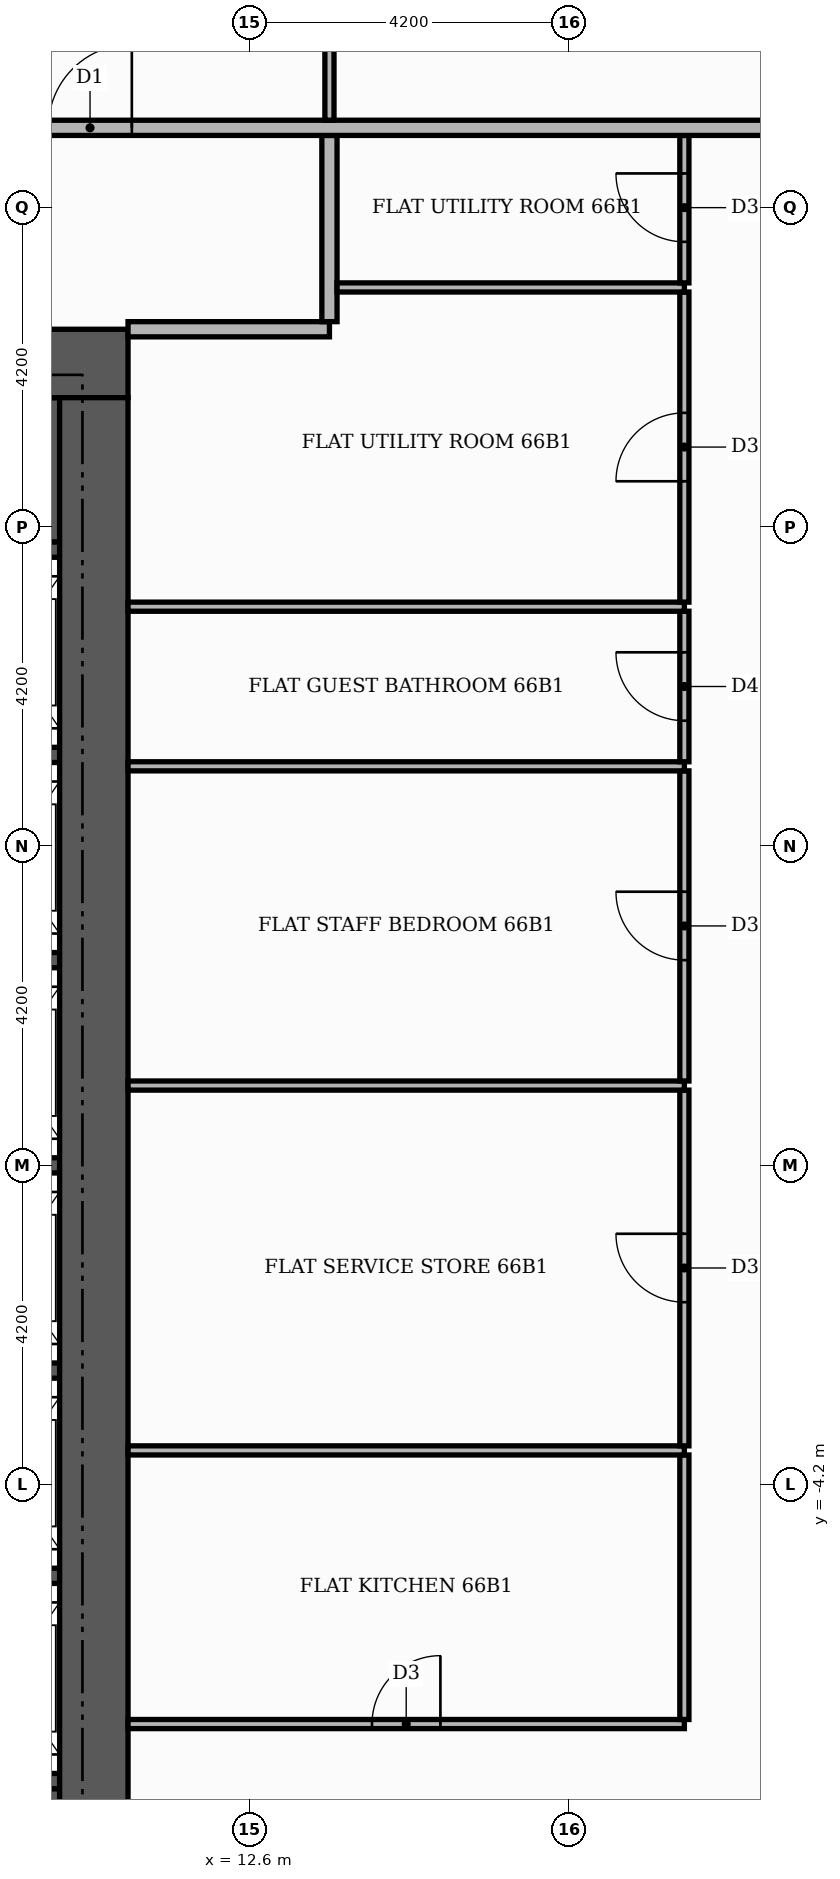
"""IFC4 building model, lengths in metres.
Left out: names, types, materials, properties, quantities, classifications, styles, units other than length and angle.
Written with IfcOpenShell. Run it as: python <this file> out.ifc"""

import sys

from ifc_helpers import new_model, si_unit, direction, frame, frame_2d, origin, place, context, subcontext, project, spatial, rectangle, extrude, element, fill, save


model = new_model("IFC4")
c1 = context("Model", 3, precision=1e-05, world=origin(), true_north=direction((0.0, 1.0)))
c2 = subcontext(c1, "Body", "Model", "MODEL_VIEW")
j1 = project(units=[si_unit("LENGTHUNIT", "METRE"), si_unit("PLANEANGLEUNIT", "RADIAN")], contexts=[c1])
p1 = place(None, origin())
s1 = spatial("IfcSite", under=j1, at=p1, CompositionType="ELEMENT")
p2 = place(p1, origin())
s2 = spatial("IfcBuilding", under=s1, at=p2, CompositionType="ELEMENT")
p3 = place(p2, frame((0.0, 0.0, 275.7)))
s3 = spatial("IfcBuildingStorey", under=s2, at=p3, CompositionType="ELEMENT", Elevation=275.7)
for number, where, z_axis, x_axis in (
    (1, (5.5, -9.15, 0.0), (0.0, 0.0, 1.0), (1.0, 0.0, 0.0)),
    (2, (5.5, 9.15, 0.0), (0.0, 0.0, 1.0), (1.0, 0.0, 0.0)),
):
    element("IfcWall", number, at=place(p3, frame(where, z_axis=z_axis, x_axis=x_axis)), inside=s3, PredefinedType="SHEAR", context=c2, shape_type="SweptSolid", body=[
        extrude(rectangle(XDim=4.6, YDim=1.9, at=frame_2d((2.3, 0.0))), origin(), (0.0, 0.0, 1.0), 3.48),
    ])
for number, where, z_axis, x_axis in (
    (3, (8.1, -8.1, 0.0), (0.0, 0.0, 1.0), (1.0, 0.0, 0.0)),
    (4, (8.1, -5.4, 0.0), (0.0, 0.0, 1.0), (1.0, 0.0, 0.0)),
    (5, (8.1, -2.7, 0.0), (0.0, 0.0, 1.0), (1.0, 0.0, 0.0)),
    (6, (8.1, 0.0, 0.0), (0.0, 0.0, 1.0), (1.0, 0.0, 0.0)),
    (7, (8.1, 2.7, 0.0), (0.0, 0.0, 1.0), (1.0, 0.0, 0.0)),
    (8, (8.1, 5.4, 0.0), (0.0, 0.0, 1.0), (1.0, 0.0, 0.0)),
    (9, (8.1, 8.1, 0.0), (0.0, 0.0, 1.0), (1.0, 0.0, 0.0)),
):
    element("IfcWall", number, at=place(p3, frame(where, z_axis=z_axis, x_axis=x_axis)), inside=s3, PredefinedType="SHEAR", context=c2, shape_type="SweptSolid", body=[
        extrude(rectangle(XDim=2.0, YDim=0.2, at=frame_2d((1.0, 0.0))), origin(), (0.0, 0.0, 1.0), 3.48),
    ])
p4 = place(p3, frame((-11.0, 10.55, 0.0), z_axis=(0.0, 0.0, 1.0), x_axis=(1.0, 0.0, 0.0)))
e10 = element("IfcWall", 10, at=p4, inside=s3, PredefinedType="SHEAR", context=c2, shape_type="SweptSolid", body=[
    extrude(rectangle(XDim=22.0, YDim=0.9, at=frame_2d((11.0, 0.0))), origin(), (0.0, 0.0, 1.0), 3.48),
])
p5 = place(p4, frame((13.3, 0.0, 0.0)))
e11 = element("IfcOpeningElement", 11, at=p5, cuts=e10, PredefinedType="OPENING", context=c2, shape_type="SweptSolid", body=[
    extrude(rectangle(XDim=1.8, YDim=2.2, at=frame_2d((0.9, 1.1))), frame((0.0, 0.46, 0.0), z_axis=(0.0, -1.0, 0.0), x_axis=(1.0, 0.0, 0.0)), (0.0, 0.0, 1.0), 0.92),
])
p6 = place(p3, frame((10.55, -10.1, 0.0), z_axis=(0.0, 0.0, 1.0), x_axis=(0.0, 1.0, 0.0)))
e12 = element("IfcWall", 12, at=p6, inside=s3, PredefinedType="SHEAR", context=c2, shape_type="SweptSolid", body=[
    extrude(rectangle(XDim=20.2, YDim=0.9, at=frame_2d((10.1, 0.0))), origin(), (0.0, 0.0, 1.0), 3.48),
])
p7 = place(p3, frame((11.0, -7.35, 0.0), z_axis=(0.0, 0.0, 1.0), x_axis=(1.0, 0.0, 0.0)))
e13 = element("IfcWall", 13, at=p7, inside=s3, PredefinedType="PARTITIONING", context=c2, shape_type="SweptSolid", body=[
    extrude(rectangle(XDim=7.32, YDim=0.12, at=frame_2d((3.66, 0.0))), origin(), (0.0, 0.0, 1.0), 3.48),
])
p8 = place(p7, frame((3.21, 0.0, 0.0)))
e14 = element("IfcOpeningElement", 14, at=p8, cuts=e13, PredefinedType="OPENING", context=c2, shape_type="SweptSolid", body=[
    extrude(rectangle(XDim=0.9, YDim=2.1, at=frame_2d((0.45, 1.05))), frame((0.0, 0.07, 0.0), z_axis=(0.0, -1.0, 0.0), x_axis=(1.0, 0.0, 0.0)), (0.0, 0.0, 1.0), 0.14),
])
p9 = place(p3, frame((18.32, -7.29, 0.0), z_axis=(0.0, 0.0, 1.0), x_axis=(0.0, 1.0, 0.0)))
e15 = element("IfcWall", 15, at=p9, inside=s3, PredefinedType="PARTITIONING", context=c2, shape_type="SweptSolid", body=[
    extrude(rectangle(XDim=3.48, YDim=0.12, at=frame_2d((1.74, 0.0))), origin(), (0.0, 0.0, 1.0), 3.48),
])
p10 = place(p3, frame((11.0, -3.75, 0.0), z_axis=(0.0, 0.0, 1.0), x_axis=(1.0, 0.0, 0.0)))
e16 = element("IfcWall", 16, at=p10, inside=s3, PredefinedType="PARTITIONING", context=c2, shape_type="SweptSolid", body=[
    extrude(rectangle(XDim=7.32, YDim=0.12, at=frame_2d((3.66, 0.0))), origin(), (0.0, 0.0, 1.0), 3.48),
])
p11 = place(p3, frame((18.32, -3.69, 0.0), z_axis=(0.0, 0.0, 1.0), x_axis=(0.0, 1.0, 0.0)))
e17 = element("IfcWall", 17, at=p11, inside=s3, PredefinedType="PARTITIONING", context=c2, shape_type="SweptSolid", body=[
    extrude(rectangle(XDim=4.68, YDim=0.12, at=frame_2d((2.34, 0.0))), origin(), (0.0, 0.0, 1.0), 3.48),
])
p12 = place(p11, frame((1.89, 0.0, 0.0)))
e18 = element("IfcOpeningElement", 18, at=p12, cuts=e17, PredefinedType="OPENING", context=c2, shape_type="SweptSolid", body=[
    extrude(rectangle(XDim=0.9, YDim=2.1, at=frame_2d((0.45, 1.05))), frame((0.0, 0.07, 0.0), z_axis=(0.0, -1.0, 0.0), x_axis=(1.0, 0.0, 0.0)), (0.0, 0.0, 1.0), 0.14),
])
p13 = place(p3, frame((11.0, 1.05, 0.0), z_axis=(0.0, 0.0, 1.0), x_axis=(1.0, 0.0, 0.0)))
e19 = element("IfcWall", 19, at=p13, inside=s3, PredefinedType="PARTITIONING", context=c2, shape_type="SweptSolid", body=[
    extrude(rectangle(XDim=7.32, YDim=0.12, at=frame_2d((3.66, 0.0))), origin(), (0.0, 0.0, 1.0), 3.48),
])
p14 = place(p3, frame((18.32, 1.11, 0.0), z_axis=(0.0, 0.0, 1.0), x_axis=(0.0, 1.0, 0.0)))
e20 = element("IfcWall", 20, at=p14, inside=s3, PredefinedType="PARTITIONING", context=c2, shape_type="SweptSolid", body=[
    extrude(rectangle(XDim=4.08, YDim=0.12, at=frame_2d((2.04, 0.0))), origin(), (0.0, 0.0, 1.0), 3.48),
])
p15 = place(p14, frame((1.59, 0.0, 0.0)))
e21 = element("IfcOpeningElement", 21, at=p15, cuts=e20, PredefinedType="OPENING", context=c2, shape_type="SweptSolid", body=[
    extrude(rectangle(XDim=0.9, YDim=2.1, at=frame_2d((0.45, 1.05))), frame((0.0, 0.07, 0.0), z_axis=(0.0, -1.0, 0.0), x_axis=(1.0, 0.0, 0.0)), (0.0, 0.0, 1.0), 0.14),
])
p16 = place(p3, frame((11.0, 5.25, 0.0), z_axis=(0.0, 0.0, 1.0), x_axis=(1.0, 0.0, 0.0)))
e22 = element("IfcWall", 22, at=p16, inside=s3, PredefinedType="PARTITIONING", context=c2, shape_type="SweptSolid", body=[
    extrude(rectangle(XDim=7.32, YDim=0.12, at=frame_2d((3.66, 0.0))), origin(), (0.0, 0.0, 1.0), 3.48),
])
p17 = place(p3, frame((18.32, 5.31, 0.0), z_axis=(0.0, 0.0, 1.0), x_axis=(0.0, 1.0, 0.0)))
e23 = element("IfcWall", 23, at=p17, inside=s3, PredefinedType="PARTITIONING", context=c2, shape_type="SweptSolid", body=[
    extrude(rectangle(XDim=1.98, YDim=0.12, at=frame_2d((0.99, 0.0))), origin(), (0.0, 0.0, 1.0), 3.48),
])
p18 = place(p17, frame((0.54, 0.0, 0.0)))
e24 = element("IfcOpeningElement", 24, at=p18, cuts=e23, PredefinedType="OPENING", context=c2, shape_type="SweptSolid", body=[
    extrude(rectangle(XDim=0.9, YDim=2.1, at=frame_2d((0.45, 1.05))), frame((0.0, 0.07, 0.0), z_axis=(0.0, -1.0, 0.0), x_axis=(1.0, 0.0, 0.0)), (0.0, 0.0, 1.0), 0.14),
])
p19 = place(p3, frame((11.0, 7.35, 0.0), z_axis=(0.0, 0.0, 1.0), x_axis=(1.0, 0.0, 0.0)))
e25 = element("IfcWall", 25, at=p19, inside=s3, PredefinedType="PARTITIONING", context=c2, shape_type="SweptSolid", body=[
    extrude(rectangle(XDim=7.32, YDim=0.12, at=frame_2d((3.66, 0.0))), origin(), (0.0, 0.0, 1.0), 3.48),
])
p20 = place(p3, frame((18.32, 7.41, 0.0), z_axis=(0.0, 0.0, 1.0), x_axis=(0.0, 1.0, 0.0)))
e26 = element("IfcWall", 26, at=p20, inside=s3, PredefinedType="PARTITIONING", context=c2, shape_type="SweptSolid", body=[
    extrude(rectangle(XDim=4.08, YDim=0.12, at=frame_2d((2.04, 0.0))), origin(), (0.0, 0.0, 1.0), 3.48),
])
p21 = place(p20, frame((1.59, 0.0, 0.0)))
e27 = element("IfcOpeningElement", 27, at=p21, cuts=e26, PredefinedType="OPENING", context=c2, shape_type="SweptSolid", body=[
    extrude(rectangle(XDim=0.9, YDim=2.1, at=frame_2d((0.45, 1.05))), frame((0.0, 0.07, 0.0), z_axis=(0.0, -1.0, 0.0), x_axis=(1.0, 0.0, 0.0)), (0.0, 0.0, 1.0), 0.14),
])
p22 = place(p3, frame((11.0, 11.0, 0.0), z_axis=(0.0, 0.0, 1.0), x_axis=(1.0, 0.0, 0.0)))
e28 = element("IfcWall", 28, at=p22, inside=s3, PredefinedType="PARTITIONING", context=c2, shape_type="SweptSolid", body=[
    extrude(rectangle(XDim=2.65, YDim=0.2, at=frame_2d((1.325, 0.0))), origin(), (0.0, 0.0, 1.0), 3.48),
])
p23 = place(p3, frame((13.65, 11.1, 0.0), z_axis=(0.0, 0.0, 1.0), x_axis=(0.0, 1.0, 0.0)))
e29 = element("IfcWall", 29, at=p23, inside=s3, PredefinedType="PARTITIONING", context=c2, shape_type="SweptSolid", body=[
    extrude(rectangle(XDim=2.45, YDim=0.2, at=frame_2d((1.225, 0.0))), origin(), (0.0, 0.0, 1.0), 3.48),
])
p24 = place(p3, frame((13.75, 11.55, 0.0), z_axis=(0.0, 0.0, 1.0), x_axis=(1.0, 0.0, 0.0)))
e30 = element("IfcWall", 30, at=p24, inside=s3, PredefinedType="PARTITIONING", context=c2, shape_type="SweptSolid", body=[
    extrude(rectangle(XDim=4.57, YDim=0.12, at=frame_2d((2.285, 0.0))), origin(), (0.0, 0.0, 1.0), 3.48),
])
p25 = place(p3, frame((18.32, 11.61, 0.0), z_axis=(0.0, 0.0, 1.0), x_axis=(0.0, 1.0, 0.0)))
e31 = element("IfcWall", 31, at=p25, inside=s3, PredefinedType="PARTITIONING", context=c2, shape_type="SweptSolid", body=[
    extrude(rectangle(XDim=1.94, YDim=0.12, at=frame_2d((0.97, 0.0))), origin(), (0.0, 0.0, 1.0), 3.48),
])
p26 = place(p25, frame((0.54, 0.0, 0.0)))
e32 = element("IfcOpeningElement", 32, at=p26, cuts=e31, PredefinedType="OPENING", context=c2, shape_type="SweptSolid", body=[
    extrude(rectangle(XDim=0.9, YDim=2.1, at=frame_2d((0.45, 1.05))), frame((0.0, 0.07, 0.0), z_axis=(0.0, -1.0, 0.0), x_axis=(1.0, 0.0, 0.0)), (0.0, 0.0, 1.0), 0.14),
])
p27 = place(p3, frame((-13.65, 13.65, 0.0), z_axis=(0.0, 0.0, 1.0), x_axis=(1.0, 0.0, 0.0)))
e33 = element("IfcWall", 33, at=p27, inside=s3, PredefinedType="PARTITIONING", context=c2, shape_type="SweptSolid", body=[
    extrude(rectangle(XDim=39.07, YDim=0.2, at=frame_2d((19.535, 0.0))), origin(), (0.0, 0.0, 1.0), 3.48),
])
p28 = place(p27, frame((23.6, 0.0, 0.0)))
e34 = element("IfcOpeningElement", 34, at=p28, cuts=e33, PredefinedType="OPENING", context=c2, shape_type="SweptSolid", body=[
    extrude(rectangle(XDim=1.1, YDim=2.4, at=frame_2d((0.55, 1.2))), frame((0.0, 0.11, 0.0), z_axis=(0.0, -1.0, 0.0), x_axis=(1.0, 0.0, 0.0)), (0.0, 0.0, 1.0), 0.22),
])
p29 = place(p3, frame((13.65, 13.75, 0.0), z_axis=(0.0, 0.0, 1.0), x_axis=(0.0, 1.0, 0.0)))
e35 = element("IfcWall", 35, at=p29, inside=s3, PredefinedType="PARTITIONING", context=c2, shape_type="SweptSolid", body=[
    extrude(rectangle(XDim=6.31, YDim=0.12, at=frame_2d((3.155, 0.0))), origin(), (0.0, 0.0, 1.0), 3.48),
])
p30 = place(p29, frame((2.685, 0.0, 0.0)))
e36 = element("IfcOpeningElement", 36, at=p30, cuts=e35, PredefinedType="OPENING", context=c2, shape_type="SweptSolid", body=[
    extrude(rectangle(XDim=0.9, YDim=2.1, at=frame_2d((0.45, 1.05))), frame((0.0, 0.07, 0.0), z_axis=(0.0, -1.0, 0.0), x_axis=(1.0, 0.0, 0.0)), (0.0, 0.0, 1.0), 0.14),
])
p31 = place(p8, origin())
e37 = element("IfcDoor", 37, at=p31, inside=s3, OperationType="SINGLE_SWING_RIGHT", PredefinedType="DOOR", context=c2, shape_type="SweptSolid", body=[
    extrude(rectangle(XDim=0.9, YDim=2.1, at=frame_2d((0.45, 1.05))), frame((0.0, 0.025, 0.0), z_axis=(0.0, -1.0, 0.0), x_axis=(1.0, 0.0, 0.0)), (0.0, 0.0, 1.0), 0.05),
])
fill(e14, e37)
p32 = place(p12, origin())
e38 = element("IfcDoor", 38, at=p32, inside=s3, OperationType="SINGLE_SWING_RIGHT", PredefinedType="DOOR", context=c2, shape_type="SweptSolid", body=[
    extrude(rectangle(XDim=0.9, YDim=2.1, at=frame_2d((0.45, 1.05))), frame((0.0, 0.025, 0.0), z_axis=(0.0, -1.0, 0.0), x_axis=(1.0, 0.0, 0.0)), (0.0, 0.0, 1.0), 0.05),
])
fill(e18, e38)
p33 = place(p15, origin())
e39 = element("IfcDoor", 39, at=p33, inside=s3, OperationType="SINGLE_SWING_RIGHT", PredefinedType="DOOR", context=c2, shape_type="SweptSolid", body=[
    extrude(rectangle(XDim=0.9, YDim=2.1, at=frame_2d((0.45, 1.05))), frame((0.0, 0.025, 0.0), z_axis=(0.0, -1.0, 0.0), x_axis=(1.0, 0.0, 0.0)), (0.0, 0.0, 1.0), 0.05),
])
fill(e21, e39)
p34 = place(p18, origin())
e40 = element("IfcDoor", 40, at=p34, inside=s3, OperationType="SINGLE_SWING_RIGHT", PredefinedType="DOOR", context=c2, shape_type="SweptSolid", body=[
    extrude(rectangle(XDim=0.9, YDim=2.1, at=frame_2d((0.45, 1.05))), frame((0.0, 0.025, 0.0), z_axis=(0.0, -1.0, 0.0), x_axis=(1.0, 0.0, 0.0)), (0.0, 0.0, 1.0), 0.05),
])
fill(e24, e40)
p35 = place(p21, origin())
e41 = element("IfcDoor", 41, at=p35, inside=s3, OperationType="SINGLE_SWING_LEFT", PredefinedType="DOOR", context=c2, shape_type="SweptSolid", body=[
    extrude(rectangle(XDim=0.9, YDim=2.1, at=frame_2d((0.45, 1.05))), frame((0.0, 0.025, 0.0), z_axis=(0.0, -1.0, 0.0), x_axis=(1.0, 0.0, 0.0)), (0.0, 0.0, 1.0), 0.05),
])
fill(e27, e41)
p36 = place(p26, origin())
e42 = element("IfcDoor", 42, at=p36, inside=s3, OperationType="SINGLE_SWING_RIGHT", PredefinedType="DOOR", context=c2, shape_type="SweptSolid", body=[
    extrude(rectangle(XDim=0.9, YDim=2.1, at=frame_2d((0.45, 1.05))), frame((0.0, 0.025, 0.0), z_axis=(0.0, -1.0, 0.0), x_axis=(1.0, 0.0, 0.0)), (0.0, 0.0, 1.0), 0.05),
])
fill(e32, e42)
p37 = place(p28, origin())
e43 = element("IfcDoor", 43, at=p37, inside=s3, OperationType="SINGLE_SWING_RIGHT", PredefinedType="DOOR", context=c2, shape_type="SweptSolid", body=[
    extrude(rectangle(XDim=1.1, YDim=2.4, at=frame_2d((0.55, 1.2))), frame((0.0, 0.025, 0.0), z_axis=(0.0, -1.0, 0.0), x_axis=(1.0, 0.0, 0.0)), (0.0, 0.0, 1.0), 0.05),
])
fill(e34, e43)
save(model, sys.argv[1])
